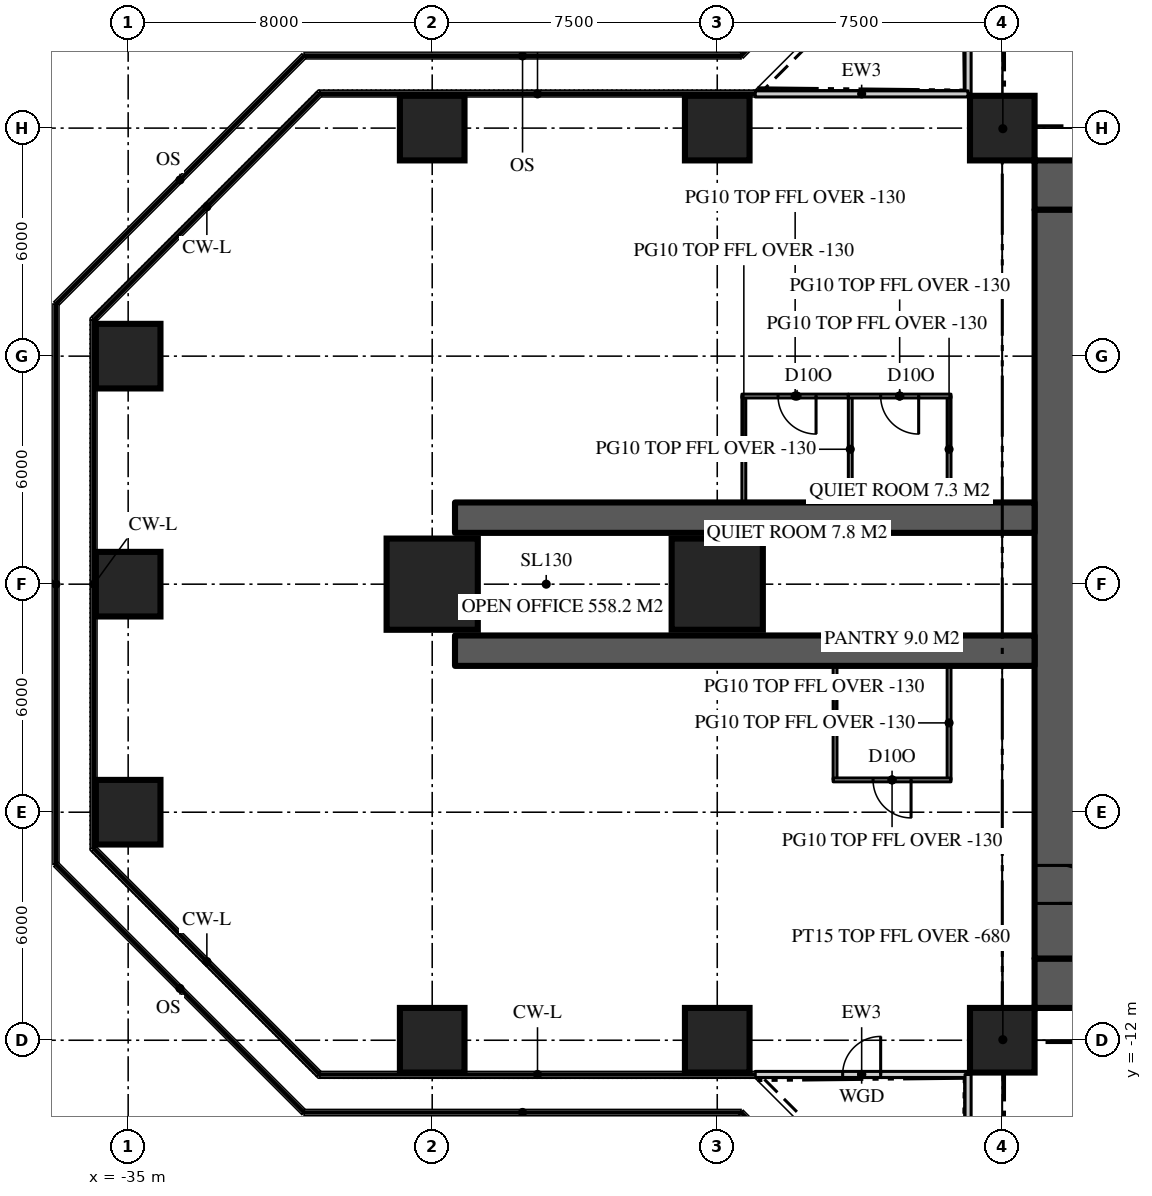
"""IFC4 building model, lengths in metres.
Left out: names, types, materials, properties, quantities, classifications, styles, units other than length and angle.
Written with IfcOpenShell. Run it as: python <this file> out.ifc"""

import sys

from ifc_helpers import new_model, si_unit, direction, frame, frame_2d, origin, origin_2d, place, context, subcontext, project, spatial, rectangle, extrude, element, fill, save


model = new_model("IFC4")
c1 = context("Model", 3, precision=1e-05, world=origin(), true_north=direction((0.0, 1.0)))
c2 = subcontext(c1, "Body", "Model", "MODEL_VIEW")
j1 = project(units=[si_unit("LENGTHUNIT", "METRE"), si_unit("PLANEANGLEUNIT", "RADIAN")], contexts=[c1])
p1 = place(None, origin())
s1 = spatial("IfcSite", under=j1, at=p1, CompositionType="ELEMENT")
p2 = place(p1, origin())
s2 = spatial("IfcBuilding", under=s1, at=p2, CompositionType="ELEMENT")
p3 = place(p2, frame((0.0, 0.0, 94.2)))
s3 = spatial("IfcBuildingStorey", under=s2, at=p3, CompositionType="ELEMENT", Elevation=94.2)
p4 = place(p3, frame((-11.15, 10.5, 0.0), z_axis=(0.0, 0.0, 1.0), x_axis=(1.0, 0.0, 0.0)))
e1 = element("IfcWall", 1, at=p4, inside=s3, PredefinedType="SHEAR", context=c2, shape_type="SweptSolid", body=[
    extrude(rectangle(XDim=22.3, YDim=1.3, at=frame_2d((11.15, 0.0))), origin(), (0.0, 0.0, 1.0), 3.9),
])
p5 = place(p4, frame((4.25, 0.0, 0.0)))
e2 = element("IfcOpeningElement", 2, at=p5, cuts=e1, PredefinedType="OPENING", context=c2, shape_type="SweptSolid", body=[
    extrude(rectangle(XDim=1.8, YDim=2.2, at=frame_2d((0.9, 1.1))), frame((0.0, 0.66, 0.0), z_axis=(0.0, -1.0, 0.0), x_axis=(1.0, 0.0, 0.0)), (0.0, 0.0, 1.0), 1.32),
])
p6 = place(p4, frame((16.25, 0.0, 0.0)))
e3 = element("IfcOpeningElement", 3, at=p6, cuts=e1, PredefinedType="OPENING", context=c2, shape_type="SweptSolid", body=[
    extrude(rectangle(XDim=1.8, YDim=2.2, at=frame_2d((0.9, 1.1))), frame((0.0, 0.66, 0.0), z_axis=(0.0, -1.0, 0.0), x_axis=(1.0, 0.0, 0.0)), (0.0, 0.0, 1.0), 1.32),
])
p7 = place(p3, frame((11.15, -10.5, 0.0), z_axis=(0.0, 0.0, 1.0), x_axis=(-1.0, 0.0, 0.0)))
e4 = element("IfcWall", 4, at=p7, inside=s3, PredefinedType="SHEAR", context=c2, shape_type="SweptSolid", body=[
    extrude(rectangle(XDim=22.3, YDim=1.3, at=frame_2d((11.15, 0.0))), origin(), (0.0, 0.0, 1.0), 3.9),
])
p8 = place(p7, frame((16.25, 0.0, 0.0)))
e5 = element("IfcOpeningElement", 5, at=p8, cuts=e4, PredefinedType="OPENING", context=c2, shape_type="SweptSolid", body=[
    extrude(rectangle(XDim=1.8, YDim=2.2, at=frame_2d((0.9, 1.1))), frame((0.0, 0.66, 0.0), z_axis=(0.0, -1.0, 0.0), x_axis=(1.0, 0.0, 0.0)), (0.0, 0.0, 1.0), 1.32),
])
p9 = place(p7, frame((4.25, 0.0, 0.0)))
e6 = element("IfcOpeningElement", 6, at=p9, cuts=e4, PredefinedType="OPENING", context=c2, shape_type="SweptSolid", body=[
    extrude(rectangle(XDim=1.8, YDim=2.2, at=frame_2d((0.9, 1.1))), frame((0.0, 0.66, 0.0), z_axis=(0.0, -1.0, 0.0), x_axis=(1.0, 0.0, 0.0)), (0.0, 0.0, 1.0), 1.32),
])
p10 = place(p3, frame((-10.5, 9.85, 0.0), z_axis=(0.0, 0.0, 1.0), x_axis=(0.0, -1.0, 0.0)))
e7 = element("IfcWall", 7, at=p10, inside=s3, PredefinedType="SHEAR", context=c2, shape_type="SweptSolid", body=[
    extrude(rectangle(XDim=19.7, YDim=1.3, at=frame_2d((9.85, 0.0))), origin(), (0.0, 0.0, 1.0), 3.9),
])
p11 = place(p10, frame((17.25, 0.0, 0.0)))
e8 = element("IfcOpeningElement", 8, at=p11, cuts=e7, PredefinedType="OPENING", context=c2, shape_type="SweptSolid", body=[
    extrude(rectangle(XDim=1.0, YDim=2.2, at=frame_2d((0.5, 1.1))), frame((0.0, 0.66, 0.0), z_axis=(0.0, -1.0, 0.0), x_axis=(1.0, 0.0, 0.0)), (0.0, 0.0, 1.0), 1.32),
])
for number, where, z_axis, x_axis in (
    (9, (-11.15, 1.75, 0.0), (0.0, 0.0, 1.0), (-1.0, 0.0, 0.0)),
    (10, (-11.15, -1.75, 0.0), (0.0, 0.0, 1.0), (-1.0, 0.0, 0.0)),
):
    element("IfcWall", number, at=place(p3, frame(where, z_axis=z_axis, x_axis=x_axis)), inside=s3, PredefinedType="SHEAR", context=c2, shape_type="SweptSolid", body=[
        extrude(rectangle(XDim=15.25, YDim=0.8, at=frame_2d((7.625, 0.0))), origin(), (0.0, 0.0, 1.0), 3.9),
    ])
for number, where, z_axis, x_axis in (
    (11, (-27.0, -12.0, 0.0), (0.0, 0.0, 1.0), (1.0, 0.0, 0.0)),
    (12, (-19.5, -12.0, 0.0), (0.0, 0.0, 1.0), (1.0, 0.0, 0.0)),
    (13, (-12.0, -12.0, 0.0), (0.0, 0.0, 1.0), (1.0, 0.0, 0.0)),
    (14, (-35.0, -6.0, 0.0), (0.0, 0.0, 1.0), (1.0, 0.0, 0.0)),
    (15, (-35.0, 0.0, 0.0), (0.0, 0.0, 1.0), (1.0, 0.0, 0.0)),
):
    element("IfcColumn", number, at=place(p3, frame(where, z_axis=z_axis, x_axis=x_axis)), inside=s3, PredefinedType="COLUMN", context=c2, shape_type="SweptSolid", body=[
        extrude(rectangle(XDim=1.7, YDim=1.7, at=origin_2d()), origin(), (0.0, 0.0, 1.0), 3.9),
    ])
for number, where, z_axis, x_axis in (
    (16, (-27.0, 0.0, 0.0), (0.0, 0.0, 1.0), (1.0, 0.0, 0.0)),
    (17, (-19.5, 0.0, 0.0), (0.0, 0.0, 1.0), (1.0, 0.0, 0.0)),
):
    element("IfcColumn", number, at=place(p3, frame(where, z_axis=z_axis, x_axis=x_axis)), inside=s3, PredefinedType="COLUMN", context=c2, shape_type="SweptSolid", body=[
        extrude(rectangle(XDim=2.4, YDim=2.4, at=origin_2d()), origin(), (0.0, 0.0, 1.0), 3.9),
    ])
for number, where, z_axis, x_axis in (
    (18, (-35.0, 6.0, 0.0), (0.0, 0.0, 1.0), (1.0, 0.0, 0.0)),
    (19, (-27.0, 12.0, 0.0), (0.0, 0.0, 1.0), (1.0, 0.0, 0.0)),
    (20, (-19.5, 12.0, 0.0), (0.0, 0.0, 1.0), (1.0, 0.0, 0.0)),
    (21, (-12.0, 12.0, 0.0), (0.0, 0.0, 1.0), (1.0, 0.0, 0.0)),
):
    element("IfcColumn", number, at=place(p3, frame(where, z_axis=z_axis, x_axis=x_axis)), inside=s3, PredefinedType="COLUMN", context=c2, shape_type="SweptSolid", body=[
        extrude(rectangle(XDim=1.7, YDim=1.7, at=origin_2d()), origin(), (0.0, 0.0, 1.0), 3.9),
    ])
p12 = place(p3, frame((-12.9, 18.5, 0.0), z_axis=(0.0, 0.0, 1.0), x_axis=(0.0, -1.0, 0.0)))
e22 = element("IfcWall", 22, at=p12, inside=s3, PredefinedType="SOLIDWALL", context=c2, shape_type="SweptSolid", body=[
    extrude(rectangle(XDim=5.6, YDim=0.16, at=frame_2d((2.8, 0.0))), origin(), (0.0, 0.0, 1.0), 3.77),
])
p13 = place(p12, frame((2.3, 0.0, 0.0)))
e23 = element("IfcOpeningElement", 23, at=p13, cuts=e22, PredefinedType="OPENING", context=c2, shape_type="SweptSolid", body=[
    extrude(rectangle(XDim=1.0, YDim=2.2, at=frame_2d((0.5, 1.1))), frame((0.0, 0.09, 0.0), z_axis=(0.0, -1.0, 0.0), x_axis=(1.0, 0.0, 0.0)), (0.0, 0.0, 1.0), 0.18),
])
p14 = place(p3, frame((-12.9, 12.9, 0.0), z_axis=(0.0, 0.0, 1.0), x_axis=(-1.0, 0.0, 0.0)))
e24 = element("IfcWall", 24, at=p14, inside=s3, PredefinedType="SOLIDWALL", context=c2, shape_type="SweptSolid", body=[
    extrude(rectangle(XDim=5.6, YDim=0.16, at=frame_2d((2.8, 0.0))), origin(), (0.0, 0.0, 1.0), 3.77),
])
p15 = place(p3, frame((-18.5, -12.9, 0.0), z_axis=(0.0, 0.0, 1.0), x_axis=(1.0, 0.0, 0.0)))
e25 = element("IfcWall", 25, at=p15, inside=s3, PredefinedType="SOLIDWALL", context=c2, shape_type="SweptSolid", body=[
    extrude(rectangle(XDim=5.6, YDim=0.16, at=frame_2d((2.8, 0.0))), origin(), (0.0, 0.0, 1.0), 3.77),
])
p16 = place(p15, frame((2.3, 0.0, 0.0)))
e26 = element("IfcOpeningElement", 26, at=p16, cuts=e25, PredefinedType="OPENING", context=c2, shape_type="SweptSolid", body=[
    extrude(rectangle(XDim=1.0, YDim=2.2, at=frame_2d((0.5, 1.1))), frame((0.0, 0.09, 0.0), z_axis=(0.0, -1.0, 0.0), x_axis=(1.0, 0.0, 0.0)), (0.0, 0.0, 1.0), 0.18),
])
p17 = place(p3, frame((-12.9, -12.9, 0.0), z_axis=(0.0, 0.0, 1.0), x_axis=(0.0, -1.0, 0.0)))
e27 = element("IfcWall", 27, at=p17, inside=s3, PredefinedType="SOLIDWALL", context=c2, shape_type="SweptSolid", body=[
    extrude(rectangle(XDim=5.6, YDim=0.16, at=frame_2d((2.8, 0.0))), origin(), (0.0, 0.0, 1.0), 3.77),
])
for number, where, z_axis, x_axis in (
    (28, (-13.4, -2.15, 0.0), (0.0, 0.0, 1.0), (0.0, -1.0, 0.0)),
    (29, (-16.4, -2.15, 0.0), (0.0, 0.0, 1.0), (0.0, -1.0, 0.0)),
):
    element("IfcWall", number, at=place(p3, frame(where, z_axis=z_axis, x_axis=x_axis)), inside=s3, PredefinedType="PARTITIONING", context=c2, shape_type="SweptSolid", body=[
        extrude(rectangle(XDim=3.0, YDim=0.1, at=frame_2d((1.5, 0.0))), origin(), (0.0, 0.0, 1.0), 3.77),
    ])
p18 = place(p3, frame((-13.35, -5.15, 0.0), z_axis=(0.0, 0.0, 1.0), x_axis=(-1.0, 0.0, 0.0)))
e30 = element("IfcWall", 30, at=p18, inside=s3, PredefinedType="PARTITIONING", context=c2, shape_type="SweptSolid", body=[
    extrude(rectangle(XDim=3.1, YDim=0.1, at=frame_2d((1.55, 0.0))), origin(), (0.0, 0.0, 1.0), 3.77),
])
p19 = place(p18, frame((1.05, 0.0, 0.0)))
e31 = element("IfcOpeningElement", 31, at=p19, cuts=e30, PredefinedType="OPENING", context=c2, shape_type="SweptSolid", body=[
    extrude(rectangle(XDim=1.0, YDim=2.2, at=frame_2d((0.5, 1.1))), frame((0.0, 0.06, 0.0), z_axis=(0.0, -1.0, 0.0), x_axis=(1.0, 0.0, 0.0)), (0.0, 0.0, 1.0), 0.12),
])
for number, where, z_axis, x_axis in (
    (32, (-13.4, 2.15, 0.0), (0.0, 0.0, 1.0), (0.0, 1.0, 0.0)),
    (33, (-16.0, 2.15, 0.0), (0.0, 0.0, 1.0), (0.0, 1.0, 0.0)),
):
    element("IfcWall", number, at=place(p3, frame(where, z_axis=z_axis, x_axis=x_axis)), inside=s3, PredefinedType="PARTITIONING", context=c2, shape_type="SweptSolid", body=[
        extrude(rectangle(XDim=2.8, YDim=0.1, at=frame_2d((1.4, 0.0))), origin(), (0.0, 0.0, 1.0), 3.77),
    ])
p20 = place(p3, frame((-13.35, 4.95, 0.0), z_axis=(0.0, 0.0, 1.0), x_axis=(-1.0, 0.0, 0.0)))
e34 = element("IfcWall", 34, at=p20, inside=s3, PredefinedType="PARTITIONING", context=c2, shape_type="SweptSolid", body=[
    extrude(rectangle(XDim=2.7, YDim=0.1, at=frame_2d((1.35, 0.0))), origin(), (0.0, 0.0, 1.0), 3.77),
])
p21 = place(p20, frame((0.85, 0.0, 0.0)))
e35 = element("IfcOpeningElement", 35, at=p21, cuts=e34, PredefinedType="OPENING", context=c2, shape_type="SweptSolid", body=[
    extrude(rectangle(XDim=1.0, YDim=2.2, at=frame_2d((0.5, 1.1))), frame((0.0, 0.06, 0.0), z_axis=(0.0, -1.0, 0.0), x_axis=(1.0, 0.0, 0.0)), (0.0, 0.0, 1.0), 0.12),
])
p22 = place(p3, frame((-18.8, 2.15, 0.0), z_axis=(0.0, 0.0, 1.0), x_axis=(0.0, 1.0, 0.0)))
e36 = element("IfcWall", 36, at=p22, inside=s3, PredefinedType="PARTITIONING", context=c2, shape_type="SweptSolid", body=[
    extrude(rectangle(XDim=2.8, YDim=0.1, at=frame_2d((1.4, 0.0))), origin(), (0.0, 0.0, 1.0), 3.77),
])
p23 = place(p3, frame((-16.05, 4.95, 0.0), z_axis=(0.0, 0.0, 1.0), x_axis=(-1.0, 0.0, 0.0)))
e37 = element("IfcWall", 37, at=p23, inside=s3, PredefinedType="PARTITIONING", context=c2, shape_type="SweptSolid", body=[
    extrude(rectangle(XDim=2.8, YDim=0.1, at=frame_2d((1.4, 0.0))), origin(), (0.0, 0.0, 1.0), 3.77),
])
p24 = place(p23, frame((0.85, 0.0, 0.0)))
e38 = element("IfcOpeningElement", 38, at=p24, cuts=e37, PredefinedType="OPENING", context=c2, shape_type="SweptSolid", body=[
    extrude(rectangle(XDim=1.0, YDim=2.2, at=frame_2d((0.5, 1.1))), frame((0.0, 0.06, 0.0), z_axis=(0.0, -1.0, 0.0), x_axis=(1.0, 0.0, 0.0)), (0.0, 0.0, 1.0), 0.12),
])
for number, where, z_axis, x_axis in (
    (39, (-11.15, 11.15, 0.0), (0.0, 0.0, 1.0), (-0.707, 0.707, 0.0)),
    (40, (-11.15, -11.15, 0.0), (0.0, 0.0, 1.0), (-0.707, -0.707, 0.0)),
):
    element("IfcWall", number, at=place(p3, frame(where, z_axis=z_axis, x_axis=x_axis)), inside=s3, PredefinedType="PARTITIONING", context=c2, shape_type="SweptSolid", body=[
        extrude(rectangle(XDim=2.362, YDim=0.15, at=frame_2d((1.181, 0.0))), origin(), (0.0, 0.0, 1.0), 3.22),
    ])
p25 = place(p16, origin())
e41 = element("IfcDoor", 41, at=p25, inside=s3, OperationType="SINGLE_SWING_RIGHT", PredefinedType="DOOR", context=c2, shape_type="SweptSolid", body=[
    extrude(rectangle(XDim=1.0, YDim=2.2, at=frame_2d((0.5, 1.1))), frame((0.0, 0.025, 0.0), z_axis=(0.0, -1.0, 0.0), x_axis=(1.0, 0.0, 0.0)), (0.0, 0.0, 1.0), 0.05),
])
fill(e26, e41)
p26 = place(p11, origin())
e42 = element("IfcDoor", 42, at=p26, inside=s3, OperationType="SINGLE_SWING_RIGHT", PredefinedType="DOOR", context=c2, shape_type="SweptSolid", body=[
    extrude(rectangle(XDim=1.0, YDim=2.2, at=frame_2d((0.5, 1.1))), frame((0.0, 0.025, 0.0), z_axis=(0.0, -1.0, 0.0), x_axis=(1.0, 0.0, 0.0)), (0.0, 0.0, 1.0), 0.05),
])
fill(e8, e42)
p27 = place(p19, origin())
e43 = element("IfcDoor", 43, at=p27, inside=s3, OperationType="SINGLE_SWING_LEFT", PredefinedType="DOOR", context=c2, shape_type="SweptSolid", body=[
    extrude(rectangle(XDim=1.0, YDim=2.2, at=frame_2d((0.5, 1.1))), frame((0.0, 0.025, 0.0), z_axis=(0.0, -1.0, 0.0), x_axis=(1.0, 0.0, 0.0)), (0.0, 0.0, 1.0), 0.05),
])
fill(e31, e43)
p28 = place(p21, origin())
e44 = element("IfcDoor", 44, at=p28, inside=s3, OperationType="SINGLE_SWING_LEFT", PredefinedType="DOOR", context=c2, shape_type="SweptSolid", body=[
    extrude(rectangle(XDim=1.0, YDim=2.2, at=frame_2d((0.5, 1.1))), frame((0.0, 0.025, 0.0), z_axis=(0.0, -1.0, 0.0), x_axis=(1.0, 0.0, 0.0)), (0.0, 0.0, 1.0), 0.05),
])
fill(e35, e44)
p29 = place(p24, origin())
e45 = element("IfcDoor", 45, at=p29, inside=s3, OperationType="SINGLE_SWING_LEFT", PredefinedType="DOOR", context=c2, shape_type="SweptSolid", body=[
    extrude(rectangle(XDim=1.0, YDim=2.2, at=frame_2d((0.5, 1.1))), frame((0.0, 0.025, 0.0), z_axis=(0.0, -1.0, 0.0), x_axis=(1.0, 0.0, 0.0)), (0.0, 0.0, 1.0), 0.05),
])
fill(e38, e45)
save(model, sys.argv[1])
